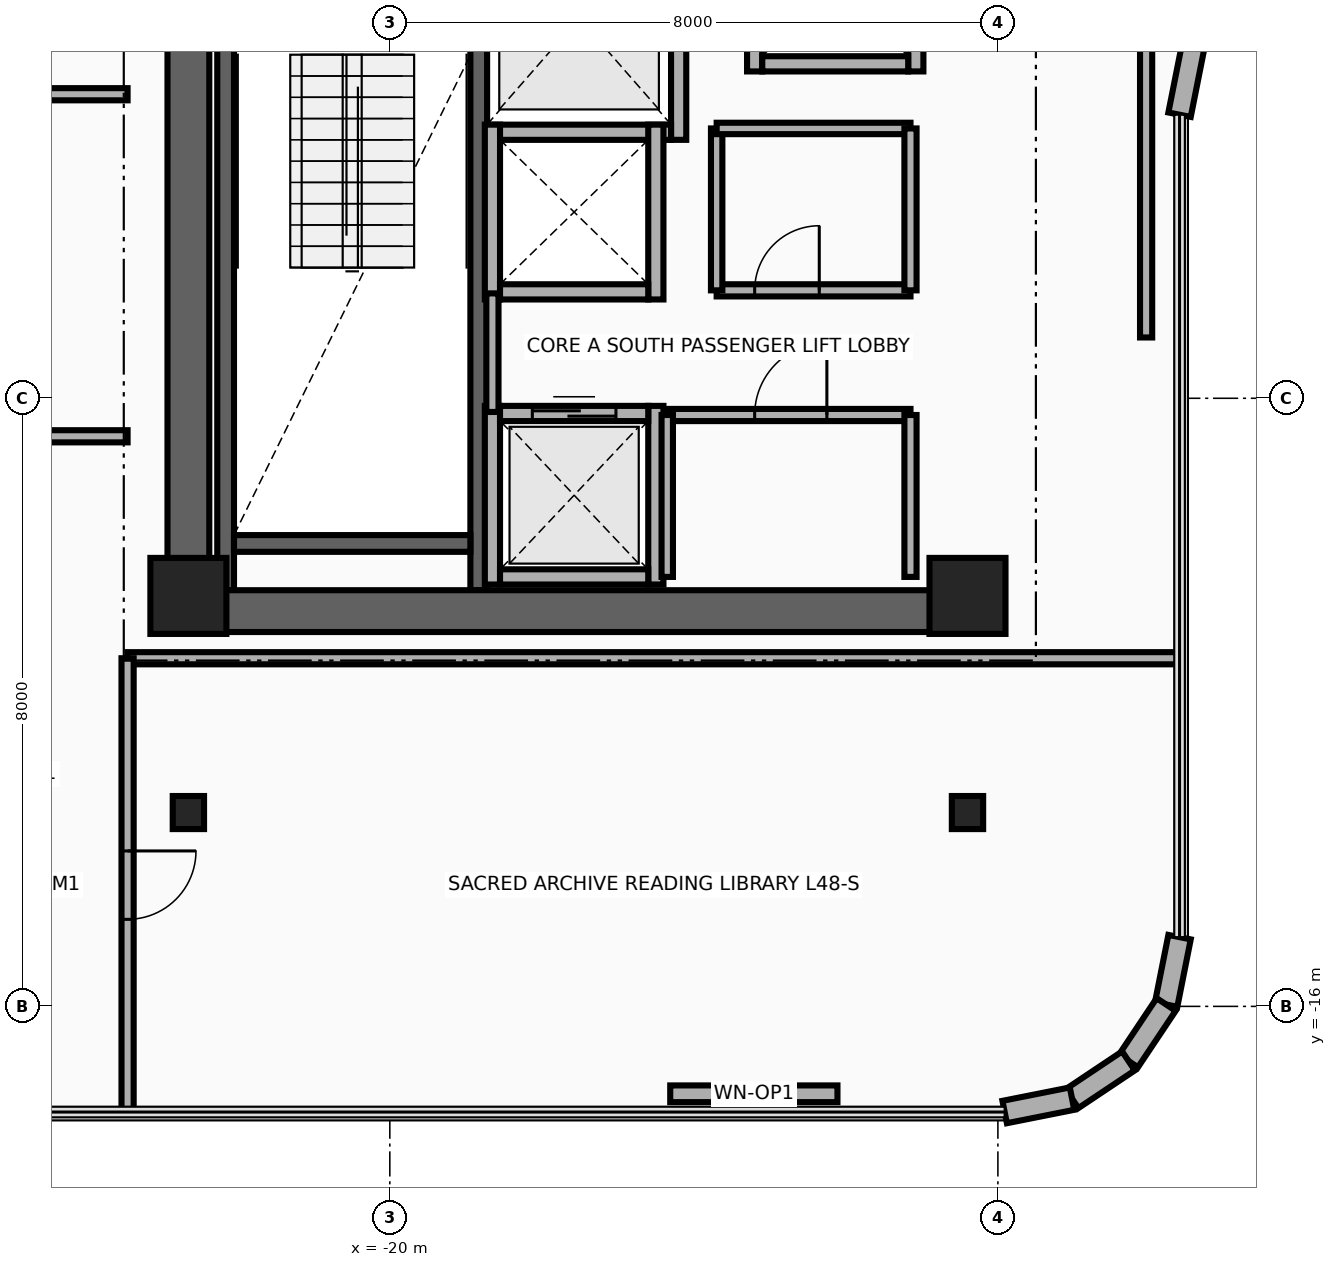
"""IFC4 building model, lengths in metres.
Left out: names, types, materials, properties, quantities, classifications, styles, units other than length and angle.
Written with IfcOpenShell. Run it as: python <this file> out.ifc"""

import sys

from ifc_helpers import new_model, si_unit, direction, frame, frame_2d, origin, origin_2d, place, context, subcontext, project, spatial, rectangle, i_section, extrude, source, transform, mapped, element, fill, save


model = new_model("IFC4")
c1 = context("Model", 3, precision=1e-05, world=origin(), true_north=direction((0.0, 1.0)))
c2 = subcontext(c1, "Body", "Model", "MODEL_VIEW")
j1 = project(units=[si_unit("LENGTHUNIT", "METRE"), si_unit("PLANEANGLEUNIT", "RADIAN")], contexts=[c1])
p1 = place(None, origin())
s1 = spatial("IfcSite", under=j1, at=p1, CompositionType="ELEMENT")
p2 = place(p1, origin())
s2 = spatial("IfcBuilding", under=s1, at=p2, CompositionType="ELEMENT")
p3 = place(p2, frame((0.0, 0.0, 188.4)))
s3 = spatial("IfcBuildingStorey", under=s2, at=p3, CompositionType="ELEMENT", Elevation=188.4)
for number, where, z_axis, x_axis in (
    (1, (-22.16, -10.525, 0.0), (0.0, 0.0, 1.0), (0.0, 1.0, 0.0)),
    (2, (-18.83, -10.525, 0.0), (0.0, 0.0, 1.0), (0.0, 1.0, 0.0)),
):
    element("IfcWall", number, at=place(p3, frame(where, z_axis=z_axis, x_axis=x_axis)), inside=s3, PredefinedType="SHEAR", context=c2, shape_type="SweptSolid", body=[
        extrude(rectangle(XDim=8.745, YDim=0.22, at=frame_2d((4.373, 0.0))), origin(), (0.0, 0.0, 1.0), 3.63),
    ])
p4 = place(p3, frame((-22.05, -9.91, 0.0), z_axis=(0.0, 0.0, 1.0), x_axis=(1.0, 0.0, 0.0)))
e3 = element("IfcWall", 3, at=p4, inside=s3, PredefinedType="SHEAR", context=c2, shape_type="SweptSolid", body=[
    extrude(rectangle(XDim=3.11, YDim=0.22, at=frame_2d((1.555, 0.0))), origin(), (0.0, 0.0, 1.0), 3.63),
])
p5 = place(p3, frame((-22.65, -11.075, 0.0), z_axis=(0.0, 0.0, 1.0), x_axis=(0.0, 1.0, 0.0)))
e4 = element("IfcWall", 4, at=p5, inside=s3, PredefinedType="SHEAR", context=c2, shape_type="SweptSolid", body=[
    extrude(rectangle(XDim=22.15, YDim=0.55, at=frame_2d((11.075, 0.0))), origin(), (0.0, 0.0, 1.0), 3.63),
])
p6 = place(p3, frame((-22.65, -10.8, 0.0), z_axis=(0.0, 0.0, 1.0), x_axis=(1.0, 0.0, 0.0)))
e5 = element("IfcWall", 5, at=p6, inside=s3, PredefinedType="SHEAR", context=c2, shape_type="SweptSolid", body=[
    extrude(rectangle(XDim=10.25, YDim=0.55, at=frame_2d((5.125, 0.0))), origin(), (0.0, 0.0, 1.0), 3.63),
])
m1 = source(origin(), c2, "Body", "SweptSolid", [
    extrude(rectangle(XDim=1.0, YDim=1.0, at=origin_2d()), origin(), (0.0, 0.0, 1.0), 3.95),
])
for number, where, z_axis, x_axis in (
    (6, (-22.65, -10.6, 0.0), (0.0, 0.0, 1.0), (1.0, 0.0, 0.0)),
    (7, (-12.4, -10.6, 0.0), (0.0, 0.0, 1.0), (1.0, 0.0, 0.0)),
):
    element("IfcColumn", number, at=place(p3, frame(where, z_axis=z_axis, x_axis=x_axis)), inside=s3, PredefinedType="COLUMN", context=c2, shape_type="MappedRepresentation", body=[
        mapped(m1, transform((0.0, 0.0, 0.0), x_axis=(1.0, 0.0, 0.0), y_axis=(0.0, 1.0, 0.0), z_axis=(0.0, 0.0, 1.0), scale=1.0)),
    ])
m2 = source(origin(), c2, "Body", "SweptSolid", [
    extrude(i_section(OverallWidth=0.412, OverallDepth=0.435, WebThickness=0.036, FlangeThickness=0.057, at=origin_2d()), origin(), (0.0, 0.0, 1.0), 3.95),
])
for number, where, z_axis, x_axis in (
    (8, (-22.65, -13.45, 0.0), (0.0, 0.0, 1.0), (1.0, 0.0, 0.0)),
    (9, (-12.4, -13.45, 0.0), (0.0, 0.0, 1.0), (1.0, 0.0, 0.0)),
):
    element("IfcColumn", number, at=place(p3, frame(where, z_axis=z_axis, x_axis=x_axis)), inside=s3, PredefinedType="COLUMN", context=c2, shape_type="MappedRepresentation", body=[
        mapped(m2, transform((0.0, 0.0, 0.0), x_axis=(1.0, 0.0, 0.0), y_axis=(0.0, 1.0, 0.0), z_axis=(0.0, 0.0, 1.0), scale=1.0)),
    ])
p7 = place(p3, frame((-9.43, -3.365, 0.0), z_axis=(0.0, 0.0, 1.0), x_axis=(-0.195301801101, -0.980743190895, 0.0)))
e10 = element("IfcWall", 10, at=p7, inside=s3, PredefinedType="SOLIDWALL", context=c2, shape_type="SweptSolid", body=[
    extrude(rectangle(XDim=0.923, YDim=0.3, at=frame_2d((0.461, 0.0))), origin(), (0.0, 0.0, 1.0), 3.63),
])
p8 = place(p3, frame((-9.61, -15.089, 0.0), z_axis=(0.0, 0.0, 1.0), x_axis=(-0.195025152871, -0.980798241101, 0.0)))
e11 = element("IfcWall", 11, at=p8, inside=s3, PredefinedType="SOLIDWALL", context=c2, shape_type="SweptSolid", body=[
    extrude(rectangle(XDim=0.904, YDim=0.3, at=frame_2d((0.452, 0.0))), origin(), (0.0, 0.0, 1.0), 3.63),
])
for number, where, z_axis, x_axis in (
    (12, (-9.786, -15.976, 0.0), (0.0, 0.0, 1.0), (-0.556, -0.832, 0.0)),
    (13, (-10.282, -16.718, 0.0), (0.0, 0.0, 1.0), (-0.832, -0.556, 0.0)),
):
    element("IfcWall", number, at=place(p3, frame(where, z_axis=z_axis, x_axis=x_axis)), inside=s3, PredefinedType="SOLIDWALL", context=c2, shape_type="SweptSolid", body=[
        extrude(rectangle(XDim=0.893, YDim=0.3, at=frame_2d((0.446, 0.0))), origin(), (0.0, 0.0, 1.0), 3.63),
    ])
p9 = place(p3, frame((-11.024, -17.214, 0.0), z_axis=(0.0, 0.0, 1.0), x_axis=(-0.980798241101, -0.195025152871, 0.0)))
e14 = element("IfcWall", 14, at=p9, inside=s3, PredefinedType="SOLIDWALL", context=c2, shape_type="SweptSolid", body=[
    extrude(rectangle(XDim=0.904, YDim=0.3, at=frame_2d((0.452, 0.0))), origin(), (0.0, 0.0, 1.0), 3.63),
])
p10 = place(p3, frame((-14.111, -17.15, 0.0), z_axis=(0.0, 0.0, 1.0), x_axis=(-1.0, 0.0, 0.0)))
e15 = element("IfcWall", 15, at=p10, inside=s3, PredefinedType="SOLIDWALL", context=c2, shape_type="SweptSolid", body=[
    extrude(rectangle(XDim=2.2, YDim=0.22, at=frame_2d((1.1, 0.0))), origin(), (0.0, 0.0, 1.0), 3.63),
])
p11 = place(p10, frame((0.65, 0.0, 0.95)))
e16 = element("IfcOpeningElement", 16, at=p11, cuts=e15, PredefinedType="OPENING", context=c2, shape_type="SweptSolid", body=[
    extrude(rectangle(XDim=0.9, YDim=1.3, at=frame_2d((0.45, 0.65))), frame((0.0, 0.125, 0.0), z_axis=(0.0, -1.0, 0.0), x_axis=(1.0, 0.0, 0.0)), (0.0, 0.0, 1.0), 0.25),
])
p12 = place(p3, frame((-16.2, -4.6, 0.0), z_axis=(0.0, 0.0, 1.0), x_axis=(0.0, 1.0, 0.0)))
e17 = element("IfcWall", 17, at=p12, inside=s3, PredefinedType="MOVABLE", context=c2, shape_type="SweptSolid", body=[
    extrude(rectangle(XDim=3.2, YDim=0.2, at=frame_2d((1.6, 0.0))), origin(), (0.0, 0.0, 1.0), 3.63),
])
p13 = place(p3, frame((-18.72, -4.5, 0.0), z_axis=(0.0, 0.0, 1.0), x_axis=(1.0, 0.0, 0.0)))
e18 = element("IfcWall", 18, at=p13, inside=s3, PredefinedType="MOVABLE", context=c2, shape_type="SweptSolid", body=[
    extrude(rectangle(XDim=2.42, YDim=0.2, at=frame_2d((1.21, 0.0))), origin(), (0.0, 0.0, 1.0), 3.63),
])
for number, where, z_axis, x_axis in (
    (19, (-18.65, -10.45, 0.0), (0.0, 0.0, 1.0), (0.0, 1.0, 0.0)),
    (20, (-16.5, -10.45, 0.0), (0.0, 0.0, 1.0), (0.0, 1.0, 0.0)),
):
    element("IfcWall", number, at=place(p3, frame(where, z_axis=z_axis, x_axis=x_axis)), inside=s3, PredefinedType="MOVABLE", context=c2, shape_type="SweptSolid", body=[
        extrude(rectangle(XDim=2.35, YDim=0.2, at=frame_2d((1.175, 0.0))), origin(), (0.0, 0.0, 1.0), 2.665),
    ])
p14 = place(p3, frame((-18.55, -10.35, 0.0), z_axis=(0.0, 0.0, 1.0), x_axis=(1.0, 0.0, 0.0)))
e21 = element("IfcWall", 21, at=p14, inside=s3, PredefinedType="MOVABLE", context=c2, shape_type="SweptSolid", body=[
    extrude(rectangle(XDim=1.95, YDim=0.2, at=frame_2d((0.975, 0.0))), origin(), (0.0, 0.0, 1.0), 2.665),
])
p15 = place(p3, frame((-18.55, -8.2, 0.0), z_axis=(0.0, 0.0, 1.0), x_axis=(1.0, 0.0, 0.0)))
e22 = element("IfcWall", 22, at=p15, inside=s3, PredefinedType="MOVABLE", context=c2, shape_type="SweptSolid", body=[
    extrude(rectangle(XDim=1.95, YDim=0.2, at=frame_2d((0.975, 0.0))), origin(), (0.0, 0.0, 1.0), 3.63),
])
p16 = place(p15, frame((0.425, 0.0, 0.0)))
e23 = element("IfcOpeningElement", 23, at=p16, cuts=e22, PredefinedType="OPENING", context=c2, shape_type="SweptSolid", body=[
    extrude(rectangle(XDim=1.1, YDim=2.1, at=frame_2d((0.55, 1.05))), frame((0.0, 0.115, 0.0), z_axis=(0.0, -1.0, 0.0), x_axis=(1.0, 0.0, 0.0)), (0.0, 0.0, 1.0), 0.23),
])
for number, where, z_axis, x_axis in (
    (24, (-18.65, -6.7, 0.0), (0.0, 0.0, 1.0), (0.0, 1.0, 0.0)),
    (25, (-16.5, -6.7, 0.0), (0.0, 0.0, 1.0), (0.0, 1.0, 0.0)),
):
    element("IfcWall", number, at=place(p3, frame(where, z_axis=z_axis, x_axis=x_axis)), inside=s3, PredefinedType="MOVABLE", context=c2, shape_type="SweptSolid", body=[
        extrude(rectangle(XDim=2.3, YDim=0.2, at=frame_2d((1.15, 0.0))), origin(), (0.0, 0.0, 1.0), 3.63),
    ])
p17 = place(p3, frame((-18.55, -6.6, 0.0), z_axis=(0.0, 0.0, 1.0), x_axis=(1.0, 0.0, 0.0)))
e26 = element("IfcWall", 26, at=p17, inside=s3, PredefinedType="MOVABLE", context=c2, shape_type="SweptSolid", body=[
    extrude(rectangle(XDim=1.95, YDim=0.2, at=frame_2d((0.975, 0.0))), origin(), (0.0, 0.0, 1.0), 3.63),
])
for number, where, z_axis, x_axis in (
    (27, (-15.2, -3.7, 0.0), (0.0, 0.0, 1.0), (0.0, 1.0, 0.0)),
    (28, (-13.08, -3.7, 0.0), (0.0, 0.0, 1.0), (0.0, 1.0, 0.0)),
):
    element("IfcWall", number, at=place(p3, frame(where, z_axis=z_axis, x_axis=x_axis)), inside=s3, PredefinedType="MOVABLE", context=c2, shape_type="SweptSolid", body=[
        extrude(rectangle(XDim=2.35, YDim=0.2, at=frame_2d((1.175, 0.0))), origin(), (0.0, 0.0, 1.0), 3.63),
    ])
p18 = place(p3, frame((-15.1, -3.6, 0.0), z_axis=(0.0, 0.0, 1.0), x_axis=(1.0, 0.0, 0.0)))
e29 = element("IfcWall", 29, at=p18, inside=s3, PredefinedType="MOVABLE", context=c2, shape_type="SweptSolid", body=[
    extrude(rectangle(XDim=1.92, YDim=0.2, at=frame_2d((0.96, 0.0))), origin(), (0.0, 0.0, 1.0), 3.63),
])
p19 = place(p3, frame((-18.65, -8.18, 0.0), z_axis=(0.0, 0.0, 1.0), x_axis=(0.0, 1.0, 0.0)))
e30 = element("IfcWall", 30, at=p19, inside=s3, PredefinedType="PARTITIONING", context=c2, shape_type="SweptSolid", body=[
    extrude(rectangle(XDim=1.56, YDim=0.16, at=frame_2d((0.78, 0.0))), origin(), (0.0, 0.0, 1.0), 3.63),
])
p20 = place(p3, frame((-16.35, -8.22, 0.0), z_axis=(0.0, 0.0, 1.0), x_axis=(1.0, 0.0, 0.0)))
e31 = element("IfcWall", 31, at=p20, inside=s3, PredefinedType="PARTITIONING", context=c2, shape_type="SweptSolid", body=[
    extrude(rectangle(XDim=3.2, YDim=0.16, at=frame_2d((1.6, 0.0))), origin(), (0.0, 0.0, 1.0), 3.63),
])
p21 = place(p20, frame((1.15, 0.0, 0.0)))
e32 = element("IfcOpeningElement", 32, at=p21, cuts=e31, PredefinedType="OPENING", context=c2, shape_type="SweptSolid", body=[
    extrude(rectangle(XDim=0.95, YDim=2.15, at=frame_2d((0.475, 1.075))), frame((0.0, 0.095, 0.0), z_axis=(0.0, -1.0, 0.0), x_axis=(1.0, 0.0, 0.0)), (0.0, 0.0, 1.0), 0.19),
])
p22 = place(p3, frame((-16.35, -10.35, 0.0), z_axis=(0.0, 0.0, 1.0), x_axis=(0.0, 1.0, 0.0)))
e33 = element("IfcWall", 33, at=p22, inside=s3, PredefinedType="PARTITIONING", context=c2, shape_type="SweptSolid", body=[
    extrude(rectangle(XDim=2.13, YDim=0.15, at=frame_2d((1.065, 0.0))), origin(), (0.0, 0.0, 1.0), 3.63),
])
p23 = place(p3, frame((-13.15, -10.35, 0.0), z_axis=(0.0, 0.0, 1.0), x_axis=(0.0, 1.0, 0.0)))
e34 = element("IfcWall", 34, at=p23, inside=s3, PredefinedType="PARTITIONING", context=c2, shape_type="SweptSolid", body=[
    extrude(rectangle(XDim=2.13, YDim=0.16, at=frame_2d((1.065, 0.0))), origin(), (0.0, 0.0, 1.0), 3.63),
])
p24 = place(p3, frame((-15.7, -6.58, 0.0), z_axis=(0.0, 0.0, 1.0), x_axis=(1.0, 0.0, 0.0)))
e35 = element("IfcWall", 35, at=p24, inside=s3, PredefinedType="PARTITIONING", context=c2, shape_type="SweptSolid", body=[
    extrude(rectangle(XDim=2.55, YDim=0.16, at=frame_2d((1.275, 0.0))), origin(), (0.0, 0.0, 1.0), 3.63),
])
p25 = place(p24, frame((0.5, 0.0, 0.0)))
e36 = element("IfcOpeningElement", 36, at=p25, cuts=e35, PredefinedType="OPENING", context=c2, shape_type="SweptSolid", body=[
    extrude(rectangle(XDim=0.85, YDim=2.05, at=frame_2d((0.425, 1.025))), frame((0.0, 0.095, 0.0), z_axis=(0.0, -1.0, 0.0), x_axis=(1.0, 0.0, 0.0)), (0.0, 0.0, 1.0), 0.19),
])
p26 = place(p3, frame((-15.7, -6.58, 0.0), z_axis=(0.0, 0.0, 1.0), x_axis=(0.0, 1.0, 0.0)))
e37 = element("IfcWall", 37, at=p26, inside=s3, PredefinedType="PARTITIONING", context=c2, shape_type="SweptSolid", body=[
    extrude(rectangle(XDim=2.13, YDim=0.15, at=frame_2d((1.065, 0.0))), origin(), (0.0, 0.0, 1.0), 3.63),
])
p27 = place(p3, frame((-15.7, -4.45, 0.0), z_axis=(0.0, 0.0, 1.0), x_axis=(1.0, 0.0, 0.0)))
e38 = element("IfcWall", 38, at=p27, inside=s3, PredefinedType="PARTITIONING", context=c2, shape_type="SweptSolid", body=[
    extrude(rectangle(XDim=2.55, YDim=0.15, at=frame_2d((1.275, 0.0))), origin(), (0.0, 0.0, 1.0), 3.63),
])
p28 = place(p3, frame((-13.15, -6.58, 0.0), z_axis=(0.0, 0.0, 1.0), x_axis=(0.0, 1.0, 0.0)))
e39 = element("IfcWall", 39, at=p28, inside=s3, PredefinedType="PARTITIONING", context=c2, shape_type="SweptSolid", body=[
    extrude(rectangle(XDim=2.13, YDim=0.16, at=frame_2d((1.065, 0.0))), origin(), (0.0, 0.0, 1.0), 3.63),
])
p29 = place(p3, frame((-23.45, -11.42, 0.0), z_axis=(0.0, 0.0, 1.0), x_axis=(1.0, 0.0, 0.0)))
e40 = element("IfcWall", 40, at=p29, inside=s3, PredefinedType="PARTITIONING", context=c2, shape_type="SweptSolid", body=[
    extrude(rectangle(XDim=13.84, YDim=0.16, at=frame_2d((6.92, 0.0))), origin(), (0.0, 0.0, 1.0), 3.004),
])
p30 = place(p3, frame((-23.45, -17.39, 0.0), z_axis=(0.0, 0.0, 1.0), x_axis=(0.0, 1.0, 0.0)))
e41 = element("IfcWall", 41, at=p30, inside=s3, PredefinedType="PARTITIONING", context=c2, shape_type="SweptSolid", body=[
    extrude(rectangle(XDim=5.97, YDim=0.16, at=frame_2d((2.985, 0.0))), origin(), (0.0, 0.0, 1.0), 3.63),
])
p31 = place(p30, frame((2.535, 0.0, 0.0)))
e42 = element("IfcOpeningElement", 42, at=p31, cuts=e41, PredefinedType="OPENING", context=c2, shape_type="SweptSolid", body=[
    extrude(rectangle(XDim=0.9, YDim=2.1, at=frame_2d((0.45, 1.05))), frame((0.0, 0.095, 0.0), z_axis=(0.0, -1.0, 0.0), x_axis=(1.0, 0.0, 0.0)), (0.0, 0.0, 1.0), 0.19),
])
p32 = place(p3, frame((-30.89, -8.5, 0.0), z_axis=(0.0, 0.0, 1.0), x_axis=(1.0, 0.0, 0.0)))
e43 = element("IfcWall", 43, at=p32, inside=s3, PredefinedType="PARTITIONING", context=c2, shape_type="SweptSolid", body=[
    extrude(rectangle(XDim=7.44, YDim=0.16, at=frame_2d((3.72, 0.0))), origin(), (0.0, 0.0, 1.0), 3.076),
])
p33 = place(p32, frame((2.82, 0.0, 0.0)))
e44 = element("IfcOpeningElement", 44, at=p33, cuts=e43, PredefinedType="OPENING", context=c2, shape_type="SweptSolid", body=[
    extrude(rectangle(XDim=1.8, YDim=2.15, at=frame_2d((0.9, 1.075))), frame((0.0, 0.095, 0.0), z_axis=(0.0, -1.0, 0.0), x_axis=(1.0, 0.0, 0.0)), (0.0, 0.0, 1.0), 0.19),
])
p34 = place(p3, frame((-30.89, -4.0, 0.0), z_axis=(0.0, 0.0, 1.0), x_axis=(1.0, 0.0, 0.0)))
e45 = element("IfcWall", 45, at=p34, inside=s3, PredefinedType="PARTITIONING", context=c2, shape_type="SweptSolid", body=[
    extrude(rectangle(XDim=7.44, YDim=0.16, at=frame_2d((3.72, 0.0))), origin(), (0.0, 0.0, 1.0), 3.076),
])
p35 = place(p34, frame((3.2, 0.0, 0.0)))
e46 = element("IfcOpeningElement", 46, at=p35, cuts=e45, PredefinedType="OPENING", context=c2, shape_type="SweptSolid", body=[
    extrude(rectangle(XDim=1.8, YDim=2.15, at=frame_2d((0.9, 1.075))), frame((0.0, 0.095, 0.0), z_axis=(0.0, -1.0, 0.0), x_axis=(1.0, 0.0, 0.0)), (0.0, 0.0, 1.0), 0.19),
])
p36 = place(p3, frame((-10.05, -7.2, 0.0), z_axis=(0.0, 0.0, 1.0), x_axis=(0.0, 1.0, 0.0)))
e47 = element("IfcWall", 47, at=p36, inside=s3, PredefinedType="PARTITIONING", context=c2, shape_type="SweptSolid", body=[
    extrude(rectangle(XDim=18.62, YDim=0.16, at=frame_2d((9.31, 0.0))), origin(), (0.0, 0.0, 1.0), 2.415),
])
p37 = place(p36, frame((12.0, 0.0, 0.0)))
e48 = element("IfcOpeningElement", 48, at=p37, cuts=e47, PredefinedType="OPENING", context=c2, shape_type="SweptSolid", body=[
    extrude(rectangle(XDim=1.8, YDim=2.15, at=frame_2d((0.9, 1.075))), frame((0.0, 0.095, 0.0), z_axis=(0.0, -1.0, 0.0), x_axis=(1.0, 0.0, 0.0)), (0.0, 0.0, 1.0), 0.19),
])
p38 = place(p11, origin())
e49 = element("IfcWindow", 49, at=p38, inside=s3, PartitioningType="SINGLE_PANEL", PredefinedType="WINDOW", context=c2, shape_type="SweptSolid", body=[
    extrude(rectangle(XDim=0.9, YDim=1.3, at=frame_2d((0.45, 0.65))), frame((0.0, 0.03, 0.0), z_axis=(0.0, -1.0, 0.0), x_axis=(1.0, 0.0, 0.0)), (0.0, 0.0, 1.0), 0.06),
])
fill(e16, e49)
p39 = place(p16, origin())
e50 = element("IfcDoor", 50, at=p39, inside=s3, OperationType="DOUBLE_DOOR_SLIDING", PredefinedType="DOOR", context=c2, shape_type="SweptSolid", body=[
    extrude(rectangle(XDim=1.1, YDim=2.1, at=frame_2d((0.55, 1.05))), frame((0.0, 0.025, 0.0), z_axis=(0.0, -1.0, 0.0), x_axis=(1.0, 0.0, 0.0)), (0.0, 0.0, 1.0), 0.05),
])
fill(e23, e50)
p40 = place(p21, origin())
e51 = element("IfcDoor", 51, at=p40, inside=s3, OperationType="SINGLE_SWING_LEFT", PredefinedType="DOOR", context=c2, shape_type="SweptSolid", body=[
    extrude(rectangle(XDim=0.95, YDim=2.15, at=frame_2d((0.475, 1.075))), frame((0.0, 0.025, 0.0), z_axis=(0.0, -1.0, 0.0), x_axis=(1.0, 0.0, 0.0)), (0.0, 0.0, 1.0), 0.05),
])
fill(e32, e51)
p41 = place(p25, origin())
e52 = element("IfcDoor", 52, at=p41, inside=s3, OperationType="SINGLE_SWING_RIGHT", PredefinedType="DOOR", context=c2, shape_type="SweptSolid", body=[
    extrude(rectangle(XDim=0.85, YDim=2.05, at=frame_2d((0.425, 1.025))), frame((0.0, 0.025, 0.0), z_axis=(0.0, -1.0, 0.0), x_axis=(1.0, 0.0, 0.0)), (0.0, 0.0, 1.0), 0.05),
])
fill(e36, e52)
p42 = place(p31, frame((0.9, 0.0, 0.0), z_axis=(0.0, 0.0, 1.0), x_axis=(-1.0, 0.0, 0.0)))
e53 = element("IfcDoor", 53, at=p42, inside=s3, OperationType="SINGLE_SWING_LEFT", PredefinedType="DOOR", context=c2, shape_type="SweptSolid", body=[
    extrude(rectangle(XDim=0.9, YDim=2.1, at=frame_2d((0.45, 1.05))), frame((0.0, 0.025, 0.0), z_axis=(0.0, -1.0, 0.0), x_axis=(1.0, 0.0, 0.0)), (0.0, 0.0, 1.0), 0.05),
])
fill(e42, e53)
save(model, sys.argv[1])
